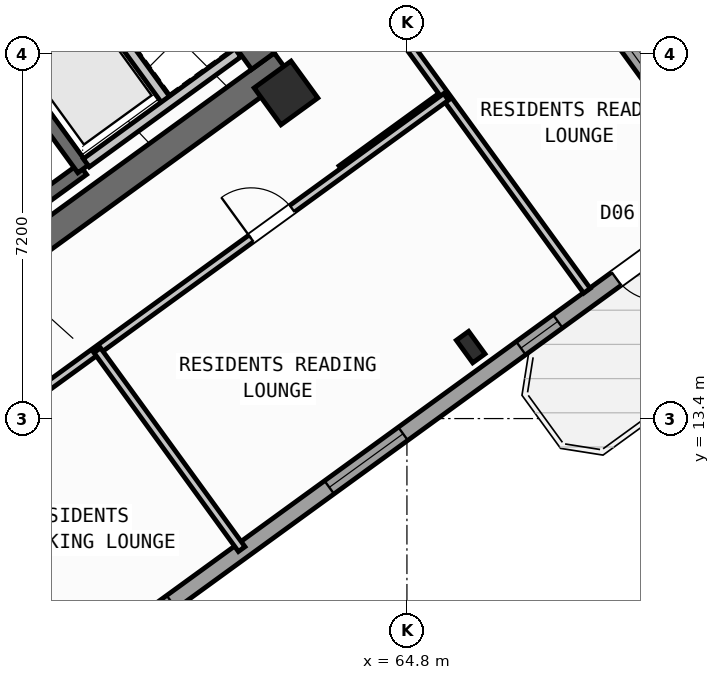
"""IFC4 building model, lengths in metres.
Left out: names, types, materials, properties, quantities, classifications, styles, units other than length and angle.
Written with IfcOpenShell. Run it as: python <this file> out.ifc"""

import sys

from ifc_helpers import new_model, si_unit, direction, frame, frame_2d, origin, origin_2d, place, context, subcontext, project, spatial, rectangle, hollow_rectangle, i_section, extrude, source, transform, mapped, element, fill, save


model = new_model("IFC4")
c1 = context("Model", 3, precision=1e-05, world=origin(), true_north=direction((0.0, 1.0)))
c2 = subcontext(c1, "Body", "Model", "MODEL_VIEW")
j1 = project(units=[si_unit("LENGTHUNIT", "METRE"), si_unit("PLANEANGLEUNIT", "RADIAN")], contexts=[c1])
p1 = place(None, origin())
s1 = spatial("IfcSite", under=j1, at=p1, CompositionType="ELEMENT")
p2 = place(p1, origin())
s2 = spatial("IfcBuilding", under=s1, at=p2, CompositionType="ELEMENT")
p3 = place(p2, frame((0.0, 0.0, 151.5)))
s3 = spatial("IfcBuildingStorey", under=s2, at=p3, CompositionType="ELEMENT", Elevation=151.5)
p4 = place(p3, frame((52.359, 13.14, 0.0), z_axis=(0.0, 0.0, 1.0), x_axis=(0.809014896919, 0.587788139183, 0.0)))
e1 = element("IfcWall", 1, at=p4, inside=s3, PredefinedType="SHEAR", context=c2, shape_type="SweptSolid", body=[
    extrude(rectangle(XDim=12.34, YDim=0.55, at=frame_2d((6.17, 0.0))), origin(), (0.0, 0.0, 1.0), 3.35),
])
p5 = place(p3, frame((61.958, 20.454, 0.0), z_axis=(0.0, 0.0, 1.0), x_axis=(-0.587802113096, 0.809004744015, 0.0)))
e2 = element("IfcWall", 2, at=p5, inside=s3, PredefinedType="SHEAR", context=c2, shape_type="SweptSolid", body=[
    extrude(rectangle(XDim=3.575, YDim=0.55, at=frame_2d((1.788, 0.0))), origin(), (0.0, 0.0, 1.0), 3.35),
])
m1 = source(origin(), c2, "Body", "SweptSolid", [
    extrude(i_section(OverallWidth=0.3, OverallDepth=0.55, WebThickness=0.015, FlangeThickness=0.029, at=origin_2d()), origin(), (0.0, 0.0, 1.0), 3.6),
])
p6 = place(p3, frame((66.058, 14.811, 0.0), z_axis=(0.0, 0.0, 1.0), x_axis=(0.809016994375, 0.587785252292, 0.0)))
e3 = element("IfcColumn", 3, at=p6, inside=s3, PredefinedType="COLUMN", context=c2, shape_type="MappedRepresentation", body=[
    mapped(m1, transform((0.0, 0.0, 0.0), scale=1.0)),
])
m2 = source(origin(), c2, "Body", "SweptSolid", [
    extrude(hollow_rectangle(XDim=0.9, YDim=0.9, WallThickness=0.036, at=origin_2d()), origin(), (0.0, 0.0, 1.0), 3.6),
])
p7 = place(p3, frame((62.414, 19.827, 0.0), z_axis=(0.0, 0.0, 1.0), x_axis=(0.809016994375, 0.587785252292, 0.0)))
e4 = element("IfcColumn", 4, at=p7, inside=s3, PredefinedType="COLUMN", context=c2, shape_type="MappedRepresentation", body=[
    mapped(m2, transform((0.0, 0.0, 0.0), scale=1.0)),
])
p8 = place(p3, frame((58.455, 35.484, 0.0), z_axis=(0.0, 0.0, 1.0), x_axis=(0.587783625747, -0.809018176127, 0.0)))
e5 = element("IfcWall", 5, at=p8, inside=s3, PredefinedType="STANDARD", context=c2, shape_type="SweptSolid", body=[
    extrude(rectangle(XDim=21.587, YDim=0.32, at=frame_2d((10.794, 0.0))), origin(), (0.0, 0.0, 1.0), 2.775),
])
p9 = place(p8, frame((1.504, 0.0, 0.85)))
e6 = element("IfcOpeningElement", 6, at=p9, cuts=e5, PredefinedType="OPENING", context=c2, shape_type="SweptSolid", body=[
    extrude(rectangle(XDim=1.8, YDim=1.5, at=frame_2d((0.9, 0.75))), frame((0.0, 0.17, 0.0), z_axis=(0.0, -1.0, 0.0), x_axis=(1.0, 0.0, 0.0)), (0.0, 0.0, 1.0), 0.34),
])
p10 = place(p8, frame((10.444, 0.0, 0.85)))
e7 = element("IfcOpeningElement", 7, at=p10, cuts=e5, PredefinedType="OPENING", context=c2, shape_type="SweptSolid", body=[
    extrude(rectangle(XDim=1.8, YDim=1.5, at=frame_2d((0.9, 0.75))), frame((0.0, 0.17, 0.0), z_axis=(0.0, -1.0, 0.0), x_axis=(1.0, 0.0, 0.0)), (0.0, 0.0, 1.0), 0.34),
])
p11 = place(p8, frame((17.62, 0.0, 0.85)))
e8 = element("IfcOpeningElement", 8, at=p11, cuts=e5, PredefinedType="OPENING", context=c2, shape_type="SweptSolid", body=[
    extrude(rectangle(XDim=1.5, YDim=1.5, at=frame_2d((0.75, 0.75))), frame((0.0, 0.17, 0.0), z_axis=(0.0, -1.0, 0.0), x_axis=(1.0, 0.0, 0.0)), (0.0, 0.0, 1.0), 0.34),
])
p12 = place(p3, frame((71.098, 17.731, 0.0), z_axis=(0.0, 0.0, 1.0), x_axis=(-0.809021120468, -0.587779573171, 0.0)))
e9 = element("IfcWall", 9, at=p12, inside=s3, PredefinedType="STANDARD", context=c2, shape_type="SweptSolid", body=[
    extrude(rectangle(XDim=17.588, YDim=0.32, at=frame_2d((8.794, 0.0))), origin(), (0.0, 0.0, 1.0), 3.35),
])
p13 = place(p12, frame((1.624, 0.0, 0.0)))
e10 = element("IfcOpeningElement", 10, at=p13, cuts=e9, PredefinedType="OPENING", context=c2, shape_type="SweptSolid", body=[
    extrude(rectangle(XDim=1.05, YDim=2.15, at=frame_2d((0.525, 1.075))), frame((0.0, 0.17, 0.0), z_axis=(0.0, -1.0, 0.0), x_axis=(1.0, 0.0, 0.0)), (0.0, 0.0, 1.0), 0.34),
])
p14 = place(p12, frame((4.104, 0.0, 1.0)))
e11 = element("IfcOpeningElement", 11, at=p14, cuts=e9, PredefinedType="OPENING", context=c2, shape_type="SweptSolid", body=[
    extrude(rectangle(XDim=0.9, YDim=1.25, at=frame_2d((0.45, 0.625))), frame((0.0, 0.17, 0.0), z_axis=(0.0, -1.0, 0.0), x_axis=(1.0, 0.0, 0.0)), (0.0, 0.0, 1.0), 0.34),
])
p15 = place(p12, frame((7.879, 0.0, 0.85)))
e12 = element("IfcOpeningElement", 12, at=p15, cuts=e9, PredefinedType="OPENING", context=c2, shape_type="SweptSolid", body=[
    extrude(rectangle(XDim=1.8, YDim=1.5, at=frame_2d((0.9, 0.75))), frame((0.0, 0.17, 0.0), z_axis=(0.0, -1.0, 0.0), x_axis=(1.0, 0.0, 0.0)), (0.0, 0.0, 1.0), 0.34),
])
p16 = place(p12, frame((13.529, 0.0, 0.85)))
e13 = element("IfcOpeningElement", 13, at=p16, cuts=e9, PredefinedType="OPENING", context=c2, shape_type="SweptSolid", body=[
    extrude(rectangle(XDim=1.5, YDim=1.5, at=frame_2d((0.75, 0.75))), frame((0.0, 0.17, 0.0), z_axis=(0.0, -1.0, 0.0), x_axis=(1.0, 0.0, 0.0)), (0.0, 0.0, 1.0), 0.34),
])
p17 = place(p3, frame((52.472, 14.013, 0.0), z_axis=(0.0, 0.0, 1.0), x_axis=(0.809028366311, 0.587769599847, 0.0)))
e14 = element("IfcWall", 14, at=p17, inside=s3, PredefinedType="SHEAR", context=c2, shape_type="SweptSolid", body=[
    extrude(rectangle(XDim=7.33, YDim=0.26, at=frame_2d((3.665, 0.0))), origin(), (0.0, 0.0, 1.0), 3.35),
])
p18 = place(p3, frame((58.41, 18.327, 0.0), z_axis=(0.0, 0.0, 1.0), x_axis=(-0.58776738483, 0.809029975545, 0.0)))
e15 = element("IfcWall", 15, at=p18, inside=s3, PredefinedType="SHEAR", context=c2, shape_type="SweptSolid", body=[
    extrude(rectangle(XDim=3.16, YDim=0.26, at=frame_2d((1.58, 0.0))), origin(), (0.0, 0.0, 1.0), 3.35),
])
p19 = place(p3, frame((60.067, 19.655, 0.0), z_axis=(0.0, 0.0, 1.0), x_axis=(-0.587800520745, 0.809005900975, 0.0)))
e16 = element("IfcWall", 16, at=p19, inside=s3, PredefinedType="STANDARD", context=c2, shape_type="SweptSolid", body=[
    extrude(rectangle(XDim=2.66, YDim=0.2, at=frame_2d((1.33, 0.0))), origin(), (0.0, 0.0, 1.0), 3.34),
])
p20 = place(p3, frame((58.472, 18.447, 0.0), z_axis=(0.0, 0.0, 1.0), x_axis=(0.809018631237, 0.587782999339, 0.0)))
e17 = element("IfcWall", 17, at=p20, inside=s3, PredefinedType="STANDARD", context=c2, shape_type="SweptSolid", body=[
    extrude(rectangle(XDim=3.698, YDim=0.2, at=frame_2d((1.849, 0.0))), origin(), (0.0, 0.0, 1.0), 3.34),
])
p21 = place(p3, frame((63.507, 18.322, 0.0), z_axis=(0.0, 0.0, 1.0), x_axis=(0.809034604122, 0.587761013791, 0.0)))
e18 = element("IfcWall", 18, at=p21, inside=s3, PredefinedType="PARTITIONING", context=c2, shape_type="SweptSolid", body=[
    extrude(rectangle(XDim=2.51, YDim=0.16, at=frame_2d((1.255, 0.0))), origin(), (0.0, 0.0, 1.0), 3.34),
])
p22 = place(p3, frame((68.353, 15.922, 0.0), z_axis=(0.0, 0.0, 1.0), x_axis=(-0.587782002009, 0.809019355834, 0.0)))
e19 = element("IfcWall", 19, at=p22, inside=s3, PredefinedType="PARTITIONING", context=c2, shape_type="SweptSolid", body=[
    extrude(rectangle(XDim=15.35, YDim=0.16, at=frame_2d((7.675, 0.0))), origin(), (0.0, 0.0, 1.0), 3.34),
])
p23 = place(p3, frame((53.705, 11.126, 0.0), z_axis=(0.0, 0.0, 1.0), x_axis=(0.809014504436, 0.587788679384, 0.0)))
e20 = element("IfcWall", 20, at=p23, inside=s3, PredefinedType="PARTITIONING", context=c2, shape_type="SweptSolid", body=[
    extrude(rectangle(XDim=14.67, YDim=0.16, at=frame_2d((7.335, 0.0))), origin(), (0.0, 0.0, 1.0), 3.34),
])
p24 = place(p23, frame((3.215, 0.0, 0.0)))
e21 = element("IfcOpeningElement", 21, at=p24, cuts=e20, PredefinedType="OPENING", context=c2, shape_type="SweptSolid", body=[
    extrude(rectangle(XDim=1.0, YDim=2.1, at=frame_2d((0.5, 1.05))), frame((0.0, 0.09, 0.0), z_axis=(0.0, -1.0, 0.0), x_axis=(1.0, 0.0, 0.0)), (0.0, 0.0, 1.0), 0.18),
])
p25 = place(p23, frame((9.915, 0.0, 0.0)))
e22 = element("IfcOpeningElement", 22, at=p25, cuts=e20, PredefinedType="OPENING", context=c2, shape_type="SweptSolid", body=[
    extrude(rectangle(XDim=1.0, YDim=2.1, at=frame_2d((0.5, 1.05))), frame((0.0, 0.09, 0.0), z_axis=(0.0, -1.0, 0.0), x_axis=(1.0, 0.0, 0.0)), (0.0, 0.0, 1.0), 0.18),
])
p26 = place(p3, frame((57.747, 7.586, 0.0), z_axis=(0.0, 0.0, 1.0), x_axis=(-0.587784893399, 0.809017255126, 0.0)))
e23 = element("IfcWall", 23, at=p26, inside=s3, PredefinedType="PARTITIONING", context=c2, shape_type="SweptSolid", body=[
    extrude(rectangle(XDim=5.48, YDim=0.16, at=frame_2d((2.74, 0.0))), origin(), (0.0, 0.0, 1.0), 3.34),
])
p27 = place(p3, frame((61.539, 10.823, 0.0), z_axis=(0.0, 0.0, 1.0), x_axis=(-0.587785532001, 0.809016791155, 0.0)))
e24 = element("IfcWall", 24, at=p27, inside=s3, PredefinedType="PARTITIONING", context=c2, shape_type="SweptSolid", body=[
    extrude(rectangle(XDim=4.85, YDim=0.16, at=frame_2d((2.425, 0.0))), origin(), (0.0, 0.0, 1.0), 3.34),
])
m3 = source(origin(), c2, "Body", "SweptSolid", [
    extrude(rectangle(XDim=1.05, YDim=2.15, at=frame_2d((0.525, 1.075))), frame((0.0, 0.025, 0.0), z_axis=(0.0, -1.0, 0.0), x_axis=(1.0, 0.0, 0.0)), (0.0, 0.0, 1.0), 0.05),
])
p28 = place(p13, origin())
e25 = element("IfcDoor", 25, at=p28, inside=s3, OperationType="SINGLE_SWING_LEFT", PredefinedType="DOOR", context=c2, shape_type="MappedRepresentation", body=[
    mapped(m3, transform((0.0, 0.0, 0.0), scale=1.0)),
])
fill(e10, e25)
m4 = source(origin(), c2, "Body", "SweptSolid", [
    extrude(rectangle(XDim=1.5, YDim=1.5, at=frame_2d((0.75, 0.75))), frame((0.0, 0.03, 0.0), z_axis=(0.0, -1.0, 0.0), x_axis=(1.0, 0.0, 0.0)), (0.0, 0.0, 1.0), 0.06),
])
p29 = place(p11, origin())
e26 = element("IfcWindow", 26, at=p29, inside=s3, PartitioningType="SINGLE_PANEL", PredefinedType="WINDOW", context=c2, shape_type="MappedRepresentation", body=[
    mapped(m4, transform((0.0, 0.0, 0.0), scale=1.0)),
])
fill(e8, e26)
m5 = source(origin(), c2, "Body", "SweptSolid", [
    extrude(rectangle(XDim=0.9, YDim=1.25, at=frame_2d((0.45, 0.625))), frame((0.0, 0.03, 0.0), z_axis=(0.0, -1.0, 0.0), x_axis=(1.0, 0.0, 0.0)), (0.0, 0.0, 1.0), 0.06),
])
p30 = place(p14, origin())
e27 = element("IfcWindow", 27, at=p30, inside=s3, PartitioningType="SINGLE_PANEL", PredefinedType="WINDOW", context=c2, shape_type="MappedRepresentation", body=[
    mapped(m5, transform((0.0, 0.0, 0.0), scale=1.0)),
])
fill(e11, e27)
m6 = source(origin(), c2, "Body", "SweptSolid", [
    extrude(rectangle(XDim=1.8, YDim=1.5, at=frame_2d((0.9, 0.75))), frame((0.0, 0.03, 0.0), z_axis=(0.0, -1.0, 0.0), x_axis=(1.0, 0.0, 0.0)), (0.0, 0.0, 1.0), 0.06),
])
p31 = place(p15, origin())
e28 = element("IfcWindow", 28, at=p31, inside=s3, PartitioningType="SINGLE_PANEL", PredefinedType="WINDOW", context=c2, shape_type="MappedRepresentation", body=[
    mapped(m6, transform((0.0, 0.0, 0.0), scale=1.0)),
])
fill(e12, e28)
m7 = source(origin(), c2, "Body", "SweptSolid", [
    extrude(rectangle(XDim=1.0, YDim=2.1, at=frame_2d((0.5, 1.05))), frame((0.0, 0.025, 0.0), z_axis=(0.0, -1.0, 0.0), x_axis=(1.0, 0.0, 0.0)), (0.0, 0.0, 1.0), 0.05),
])
p32 = place(p25, origin())
e29 = element("IfcDoor", 29, at=p32, inside=s3, OperationType="SINGLE_SWING_LEFT", PredefinedType="DOOR", context=c2, shape_type="MappedRepresentation", body=[
    mapped(m7, transform((0.0, 0.0, 0.0), scale=1.0)),
])
fill(e22, e29)
save(model, sys.argv[1])
